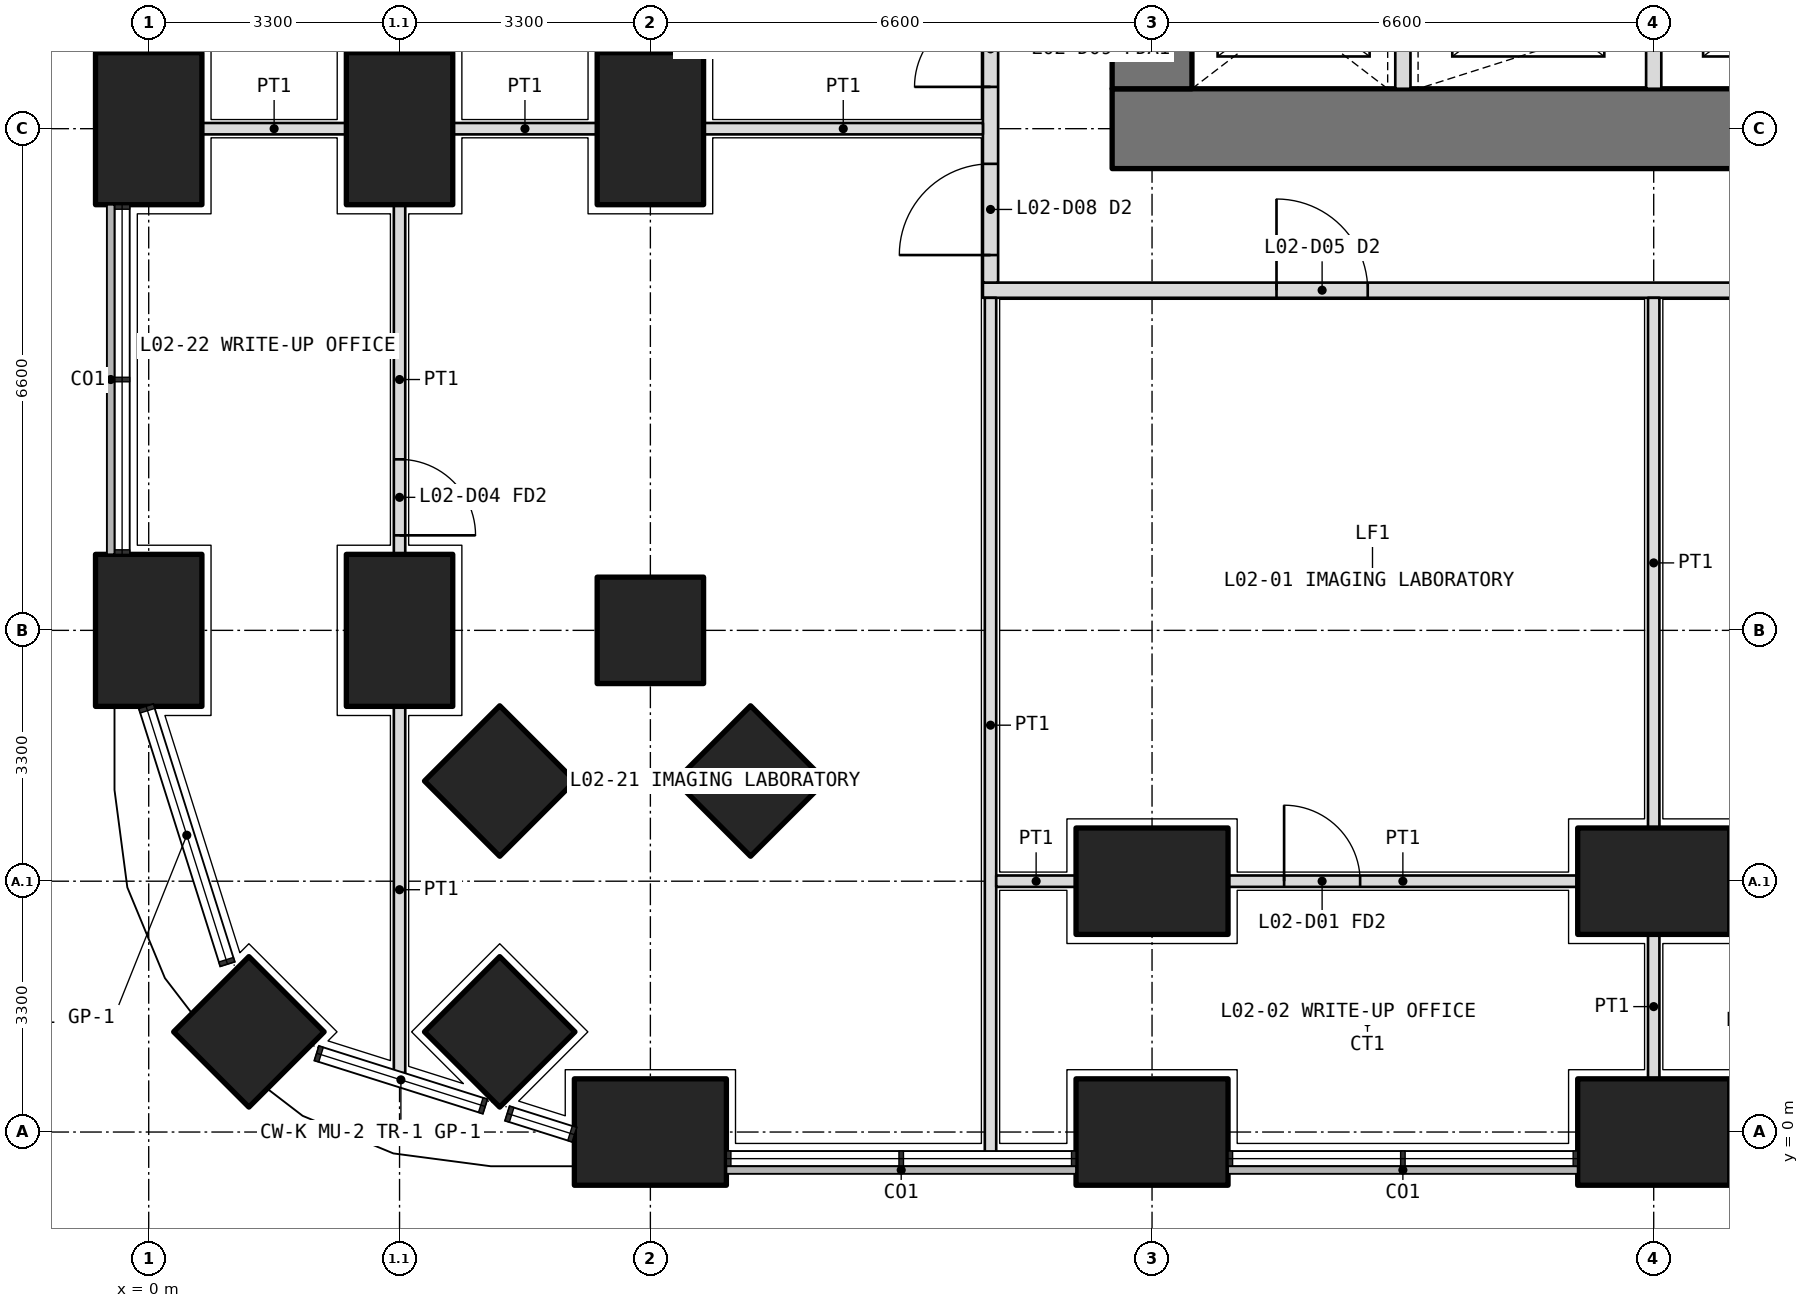
"""IFC4 building model, lengths in metres.
Left out: names, types, materials, properties, quantities, classifications, styles, units other than length and angle.
Written with IfcOpenShell. Run it as: python <this file> out.ifc"""

import sys

from ifc_helpers import new_model, si_unit, direction, frame, frame_2d, origin, origin_2d, place, context, subcontext, project, spatial, rectangle, extrude, element, fill, save


model = new_model("IFC4")
c1 = context("Model", 3, precision=1e-05, world=origin(), true_north=direction((0.0, 1.0)))
c2 = subcontext(c1, "Body", "Model", "MODEL_VIEW")
j1 = project(units=[si_unit("LENGTHUNIT", "METRE"), si_unit("PLANEANGLEUNIT", "RADIAN")], contexts=[c1])
p1 = place(None, origin())
s1 = spatial("IfcSite", under=j1, at=p1, CompositionType="ELEMENT")
p2 = place(p1, origin())
s2 = spatial("IfcBuilding", under=s1, at=p2, CompositionType="ELEMENT")
p3 = place(p2, frame((0.0, 0.0, 12.6)))
s3 = spatial("IfcBuildingStorey", under=s2, at=p3, CompositionType="ELEMENT", Elevation=12.6)
p4 = place(p3, frame((1.318, 1.318, 0.0), z_axis=(0.0, 0.0, 1.0), x_axis=(0.707106781187, 0.707106781187, 0.0)))
e1 = element("IfcColumn", 1, at=p4, inside=s3, PredefinedType="COLUMN", context=c2, shape_type="SweptSolid", body=[
    extrude(rectangle(XDim=1.4, YDim=1.4, at=origin_2d()), origin(), (0.0, 0.0, 1.0), 4.5),
])
for number, where, z_axis, x_axis in (
    (2, (6.6, 0.0, 0.0), (0.0, 0.0, 1.0), (1.0, 0.0, 0.0)),
    (3, (13.2, 0.0, 0.0), (0.0, 0.0, 1.0), (1.0, 0.0, 0.0)),
    (4, (19.8, 0.0, 0.0), (0.0, 0.0, 1.0), (1.0, 0.0, 0.0)),
    (5, (0.0, 6.6, 0.0), (0.0, 0.0, 1.0), (0.0, 1.0, 0.0)),
    (6, (0.0, 13.2, 0.0), (0.0, 0.0, 1.0), (0.0, 1.0, 0.0)),
):
    element("IfcColumn", number, at=place(p3, frame(where, z_axis=z_axis, x_axis=x_axis)), inside=s3, PredefinedType="COLUMN", context=c2, shape_type="SweptSolid", body=[
        extrude(rectangle(XDim=2.0, YDim=1.4, at=origin_2d()), origin(), (0.0, 0.0, 1.0), 4.5),
    ])
for number, where, z_axis, x_axis in (
    (7, (6.6, 6.6, 0.0), (0.0, 0.0, 1.0), (1.0, 0.0, 0.0)),
    (8, (4.618, 1.318, 0.0), (0.0, 0.0, 1.0), (0.707, 0.707, 0.0)),
):
    element("IfcColumn", number, at=place(p3, frame(where, z_axis=z_axis, x_axis=x_axis)), inside=s3, PredefinedType="COLUMN", context=c2, shape_type="SweptSolid", body=[
        extrude(rectangle(XDim=1.4, YDim=1.4, at=origin_2d()), origin(), (0.0, 0.0, 1.0), 4.5),
    ])
for number, where, z_axis, x_axis in (
    (9, (3.3, 6.6, 0.0), (0.0, 0.0, 1.0), (0.0, 1.0, 0.0)),
    (10, (3.3, 13.2, 0.0), (0.0, 0.0, 1.0), (0.0, 1.0, 0.0)),
):
    element("IfcColumn", number, at=place(p3, frame(where, z_axis=z_axis, x_axis=x_axis)), inside=s3, PredefinedType="COLUMN", context=c2, shape_type="SweptSolid", body=[
        extrude(rectangle(XDim=2.0, YDim=1.4, at=origin_2d()), origin(), (0.0, 0.0, 1.0), 4.5),
    ])
p5 = place(p3, frame((4.618, 4.618, 0.0), z_axis=(0.0, 0.0, 1.0), x_axis=(0.707106781187, 0.707106781187, 0.0)))
e11 = element("IfcColumn", 11, at=p5, inside=s3, PredefinedType="COLUMN", context=c2, shape_type="SweptSolid", body=[
    extrude(rectangle(XDim=1.4, YDim=1.4, at=origin_2d()), origin(), (0.0, 0.0, 1.0), 4.5),
])
for number, where, z_axis, x_axis in (
    (12, (13.2, 3.3, 0.0), (0.0, 0.0, 1.0), (1.0, 0.0, 0.0)),
    (13, (19.8, 3.3, 0.0), (0.0, 0.0, 1.0), (1.0, 0.0, 0.0)),
):
    element("IfcColumn", number, at=place(p3, frame(where, z_axis=z_axis, x_axis=x_axis)), inside=s3, PredefinedType="COLUMN", context=c2, shape_type="SweptSolid", body=[
        extrude(rectangle(XDim=2.0, YDim=1.4, at=origin_2d()), origin(), (0.0, 0.0, 1.0), 4.5),
    ])
p6 = place(p3, frame((7.918, 4.618, 0.0), z_axis=(0.0, 0.0, 1.0), x_axis=(0.707106781187, 0.707106781187, 0.0)))
e14 = element("IfcColumn", 14, at=p6, inside=s3, PredefinedType="COLUMN", context=c2, shape_type="SweptSolid", body=[
    extrude(rectangle(XDim=1.4, YDim=1.4, at=origin_2d()), origin(), (0.0, 0.0, 1.0), 4.5),
])
p7 = place(p3, frame((6.6, 13.2, 0.0), z_axis=(0.0, 0.0, 1.0), x_axis=(0.0, 1.0, 0.0)))
e15 = element("IfcColumn", 15, at=p7, inside=s3, PredefinedType="COLUMN", context=c2, shape_type="SweptSolid", body=[
    extrude(rectangle(XDim=2.0, YDim=1.4, at=origin_2d()), origin(), (0.0, 0.0, 1.0), 4.5),
])
p8 = place(p3, frame((12.675, 13.2, 0.0), z_axis=(0.0, 0.0, 1.0), x_axis=(1.0, 0.0, 0.0)))
e16 = element("IfcWall", 16, at=p8, inside=s3, PredefinedType="SHEAR", context=c2, shape_type="SweptSolid", body=[
    extrude(rectangle(XDim=27.45, YDim=1.05, at=frame_2d((13.725, 0.0))), origin(), (0.0, 0.0, 1.0), 4.5),
])
p9 = place(p3, frame((13.2, 32.475, 0.0), z_axis=(0.0, 0.0, 1.0), x_axis=(0.0, -1.0, 0.0)))
e17 = element("IfcWall", 17, at=p9, inside=s3, PredefinedType="SHEAR", context=c2, shape_type="SweptSolid", body=[
    extrude(rectangle(XDim=18.75, YDim=1.05, at=frame_2d((9.375, 0.0))), origin(), (0.0, 0.0, 1.0), 4.5),
])
p10 = place(p9, frame((14.125, 0.0, 0.0)))
e18 = element("IfcOpeningElement", 18, at=p10, cuts=e17, PredefinedType="OPENING", context=c2, shape_type="SweptSolid", body=[
    extrude(rectangle(XDim=1.6, YDim=2.1, at=frame_2d((0.8, 1.05))), frame((0.0, 0.535, 0.0), z_axis=(0.0, -1.0, 0.0), x_axis=(1.0, 0.0, 0.0)), (0.0, 0.0, 1.0), 1.07),
])
p11 = place(p9, frame((3.325, 0.0, 0.0)))
e19 = element("IfcOpeningElement", 19, at=p11, cuts=e17, PredefinedType="OPENING", context=c2, shape_type="SweptSolid", body=[
    extrude(rectangle(XDim=1.6, YDim=2.1, at=frame_2d((0.8, 1.05))), frame((0.0, 0.535, 0.0), z_axis=(0.0, -1.0, 0.0), x_axis=(1.0, 0.0, 0.0)), (0.0, 0.0, 1.0), 1.07),
])
for number, where, z_axis, x_axis in (
    (20, (16.5, 13.725, 0.0), (0.0, 0.0, 1.0), (0.0, 1.0, 0.0)),
    (21, (19.8, 13.725, 0.0), (0.0, 0.0, 1.0), (0.0, 1.0, 0.0)),
):
    element("IfcWall", number, at=place(p3, frame(where, z_axis=z_axis, x_axis=x_axis)), inside=s3, PredefinedType="PARTITIONING", context=c2, shape_type="SweptSolid", body=[
        extrude(rectangle(XDim=1.975, YDim=0.2, at=frame_2d((0.987, 0.0))), origin(), (0.0, 0.0, 1.0), 4.5),
    ])
p12 = place(p3, frame((10.975, 11.075, 0.0), z_axis=(0.0, 0.0, 1.0), x_axis=(1.0, 0.0, 0.0)))
e22 = element("IfcWall", 22, at=p12, inside=s3, PredefinedType="PARTITIONING", context=c2, shape_type="SweptSolid", body=[
    extrude(rectangle(XDim=30.85, YDim=0.2, at=frame_2d((15.425, 0.0))), origin(), (0.0, 0.0, 1.0), 3.15),
])
p13 = place(p12, frame((3.863, 0.0, 0.0)))
e23 = element("IfcOpeningElement", 23, at=p13, cuts=e22, PredefinedType="OPENING", context=c2, shape_type="SweptSolid", body=[
    extrude(rectangle(XDim=1.2, YDim=2.1, at=frame_2d((0.6, 1.05))), frame((0.0, 0.11, 0.0), z_axis=(0.0, -1.0, 0.0), x_axis=(1.0, 0.0, 0.0)), (0.0, 0.0, 1.0), 0.22),
])
p14 = place(p12, frame((14.825, 0.0, 0.0)))
e24 = element("IfcOpeningElement", 24, at=p14, cuts=e22, PredefinedType="OPENING", context=c2, shape_type="SweptSolid", body=[
    extrude(rectangle(XDim=1.2, YDim=2.1, at=frame_2d((0.6, 1.05))), frame((0.0, 0.11, 0.0), z_axis=(0.0, -1.0, 0.0), x_axis=(1.0, 0.0, 0.0)), (0.0, 0.0, 1.0), 0.22),
])
p15 = place(p12, frame((25.788, 0.0, 0.0)))
e25 = element("IfcOpeningElement", 25, at=p15, cuts=e22, PredefinedType="OPENING", context=c2, shape_type="SweptSolid", body=[
    extrude(rectangle(XDim=1.2, YDim=2.1, at=frame_2d((0.6, 1.05))), frame((0.0, 0.11, 0.0), z_axis=(0.0, -1.0, 0.0), x_axis=(1.0, 0.0, 0.0)), (0.0, 0.0, 1.0), 0.22),
])
p16 = place(p3, frame((11.075, 11.175, 0.0), z_axis=(0.0, 0.0, 1.0), x_axis=(0.0, 1.0, 0.0)))
e26 = element("IfcWall", 26, at=p16, inside=s3, PredefinedType="PARTITIONING", context=c2, shape_type="SweptSolid", body=[
    extrude(rectangle(XDim=23.85, YDim=0.2, at=frame_2d((11.925, 0.0))), origin(), (0.0, 0.0, 1.0), 3.15),
])
p17 = place(p16, frame((0.363, 0.0, 0.0)))
e27 = element("IfcOpeningElement", 27, at=p17, cuts=e26, PredefinedType="OPENING", context=c2, shape_type="SweptSolid", body=[
    extrude(rectangle(XDim=1.2, YDim=2.1, at=frame_2d((0.6, 1.05))), frame((0.0, 0.11, 0.0), z_axis=(0.0, -1.0, 0.0), x_axis=(1.0, 0.0, 0.0)), (0.0, 0.0, 1.0), 0.22),
])
p18 = place(p16, frame((2.575, 0.0, 0.0)))
e28 = element("IfcOpeningElement", 28, at=p18, cuts=e26, PredefinedType="OPENING", context=c2, shape_type="SweptSolid", body=[
    extrude(rectangle(XDim=1.0, YDim=2.1, at=frame_2d((0.5, 1.05))), frame((0.0, 0.11, 0.0), z_axis=(0.0, -1.0, 0.0), x_axis=(1.0, 0.0, 0.0)), (0.0, 0.0, 1.0), 0.22),
])
p19 = place(p16, frame((5.625, 0.0, 0.0)))
e29 = element("IfcOpeningElement", 29, at=p19, cuts=e26, PredefinedType="OPENING", context=c2, shape_type="SweptSolid", body=[
    extrude(rectangle(XDim=0.9, YDim=2.1, at=frame_2d((0.45, 1.05))), frame((0.0, 0.11, 0.0), z_axis=(0.0, -1.0, 0.0), x_axis=(1.0, 0.0, 0.0)), (0.0, 0.0, 1.0), 0.22),
])
p20 = place(p16, frame((9.425, 0.0, 0.0)))
e30 = element("IfcOpeningElement", 30, at=p20, cuts=e26, PredefinedType="OPENING", context=c2, shape_type="SweptSolid", body=[
    extrude(rectangle(XDim=0.9, YDim=2.1, at=frame_2d((0.45, 1.05))), frame((0.0, 0.11, 0.0), z_axis=(0.0, -1.0, 0.0), x_axis=(1.0, 0.0, 0.0)), (0.0, 0.0, 1.0), 0.22),
])
p21 = place(p16, frame((12.975, 0.0, 0.0)))
e31 = element("IfcOpeningElement", 31, at=p21, cuts=e26, PredefinedType="OPENING", context=c2, shape_type="SweptSolid", body=[
    extrude(rectangle(XDim=1.0, YDim=2.1, at=frame_2d((0.5, 1.05))), frame((0.0, 0.11, 0.0), z_axis=(0.0, -1.0, 0.0), x_axis=(1.0, 0.0, 0.0)), (0.0, 0.0, 1.0), 0.22),
])
p22 = place(p16, frame((18.988, 0.0, 0.0)))
e32 = element("IfcOpeningElement", 32, at=p22, cuts=e26, PredefinedType="OPENING", context=c2, shape_type="SweptSolid", body=[
    extrude(rectangle(XDim=1.2, YDim=2.1, at=frame_2d((0.6, 1.05))), frame((0.0, 0.11, 0.0), z_axis=(0.0, -1.0, 0.0), x_axis=(1.0, 0.0, 0.0)), (0.0, 0.0, 1.0), 0.22),
])
p23 = place(p3, frame((11.075, -0.27, 0.0), z_axis=(0.0, 0.0, 1.0), x_axis=(0.0, 1.0, 0.0)))
e33 = element("IfcWall", 33, at=p23, inside=s3, PredefinedType="PARTITIONING", context=c2, shape_type="SweptSolid", body=[
    extrude(rectangle(XDim=11.245, YDim=0.15, at=frame_2d((5.623, 0.0))), origin(), (0.0, 0.0, 1.0), 3.0),
])
p24 = place(p3, frame((11.15, 3.3, 0.0), z_axis=(0.0, 0.0, 1.0), x_axis=(1.0, 0.0, 0.0)))
e34 = element("IfcWall", 34, at=p24, inside=s3, PredefinedType="PARTITIONING", context=c2, shape_type="SweptSolid", body=[
    extrude(rectangle(XDim=1.05, YDim=0.15, at=frame_2d((0.525, 0.0))), origin(), (0.0, 0.0, 1.0), 4.2),
])
p25 = place(p3, frame((14.2, 3.3, 0.0), z_axis=(0.0, 0.0, 1.0), x_axis=(1.0, 0.0, 0.0)))
e35 = element("IfcWall", 35, at=p25, inside=s3, PredefinedType="PARTITIONING", context=c2, shape_type="SweptSolid", body=[
    extrude(rectangle(XDim=4.6, YDim=0.15, at=frame_2d((2.3, 0.0))), origin(), (0.0, 0.0, 1.0), 4.2),
])
p26 = place(p25, frame((0.738, 0.0, 0.0)))
e36 = element("IfcOpeningElement", 36, at=p26, cuts=e35, PredefinedType="OPENING", context=c2, shape_type="SweptSolid", body=[
    extrude(rectangle(XDim=1.0, YDim=2.1, at=frame_2d((0.5, 1.05))), frame((0.0, 0.085, 0.0), z_axis=(0.0, -1.0, 0.0), x_axis=(1.0, 0.0, 0.0)), (0.0, 0.0, 1.0), 0.17),
])
p27 = place(p3, frame((20.8, 3.3, 0.0), z_axis=(0.0, 0.0, 1.0), x_axis=(1.0, 0.0, 0.0)))
e37 = element("IfcWall", 37, at=p27, inside=s3, PredefinedType="PARTITIONING", context=c2, shape_type="SweptSolid", body=[
    extrude(rectangle(XDim=4.6, YDim=0.15, at=frame_2d((2.3, 0.0))), origin(), (0.0, 0.0, 1.0), 4.2),
])
p28 = place(p27, frame((3.35, 0.0, 0.0)))
e38 = element("IfcOpeningElement", 38, at=p28, cuts=e37, PredefinedType="OPENING", context=c2, shape_type="SweptSolid", body=[
    extrude(rectangle(XDim=1.0, YDim=2.1, at=frame_2d((0.5, 1.05))), frame((0.0, 0.085, 0.0), z_axis=(0.0, -1.0, 0.0), x_axis=(1.0, 0.0, 0.0)), (0.0, 0.0, 1.0), 0.17),
])
p29 = place(p3, frame((19.8, 0.7, 0.0), z_axis=(0.0, 0.0, 1.0), x_axis=(0.0, 1.0, 0.0)))
e39 = element("IfcWall", 39, at=p29, inside=s3, PredefinedType="PARTITIONING", context=c2, shape_type="SweptSolid", body=[
    extrude(rectangle(XDim=1.9, YDim=0.15, at=frame_2d((0.95, 0.0))), origin(), (0.0, 0.0, 1.0), 3.15),
])
p30 = place(p3, frame((19.8, 4.0, 0.0), z_axis=(0.0, 0.0, 1.0), x_axis=(0.0, 1.0, 0.0)))
e40 = element("IfcWall", 40, at=p30, inside=s3, PredefinedType="PARTITIONING", context=c2, shape_type="SweptSolid", body=[
    extrude(rectangle(XDim=6.975, YDim=0.15, at=frame_2d((3.488, 0.0))), origin(), (0.0, 0.0, 1.0), 3.15),
])
p31 = place(p3, frame((3.3, 12.2, 0.0), z_axis=(0.0, 0.0, 1.0), x_axis=(0.0, -1.0, 0.0)))
e41 = element("IfcWall", 41, at=p31, inside=s3, PredefinedType="PARTITIONING", context=c2, shape_type="SweptSolid", body=[
    extrude(rectangle(XDim=4.6, YDim=0.15, at=frame_2d((2.3, 0.0))), origin(), (0.0, 0.0, 1.0), 4.2),
])
p32 = place(p31, frame((3.35, 0.0, 0.0)))
e42 = element("IfcOpeningElement", 42, at=p32, cuts=e41, PredefinedType="OPENING", context=c2, shape_type="SweptSolid", body=[
    extrude(rectangle(XDim=1.0, YDim=2.1, at=frame_2d((0.5, 1.05))), frame((0.0, 0.085, 0.0), z_axis=(0.0, -1.0, 0.0), x_axis=(1.0, 0.0, 0.0)), (0.0, 0.0, 1.0), 0.17),
])
p33 = place(p3, frame((3.3, 5.6, 0.0), z_axis=(0.0, 0.0, 1.0), x_axis=(0.0, -1.0, 0.0)))
e43 = element("IfcWall", 43, at=p33, inside=s3, PredefinedType="PARTITIONING", context=c2, shape_type="SweptSolid", body=[
    extrude(rectangle(XDim=4.824, YDim=0.15, at=frame_2d((2.412, 0.0))), origin(), (0.0, 0.0, 1.0), 3.0),
])
p34 = place(p3, frame((0.7, 13.2, 0.0), z_axis=(0.0, 0.0, 1.0), x_axis=(1.0, 0.0, 0.0)))
e44 = element("IfcWall", 44, at=p34, inside=s3, PredefinedType="PARTITIONING", context=c2, shape_type="SweptSolid", body=[
    extrude(rectangle(XDim=1.9, YDim=0.15, at=frame_2d((0.95, 0.0))), origin(), (0.0, 0.0, 1.0), 3.15),
])
p35 = place(p3, frame((4.0, 13.2, 0.0), z_axis=(0.0, 0.0, 1.0), x_axis=(1.0, 0.0, 0.0)))
e45 = element("IfcWall", 45, at=p35, inside=s3, PredefinedType="PARTITIONING", context=c2, shape_type="SweptSolid", body=[
    extrude(rectangle(XDim=1.9, YDim=0.15, at=frame_2d((0.95, 0.0))), origin(), (0.0, 0.0, 1.0), 3.15),
])
p36 = place(p3, frame((7.3, 13.2, 0.0), z_axis=(0.0, 0.0, 1.0), x_axis=(1.0, 0.0, 0.0)))
e46 = element("IfcWall", 46, at=p36, inside=s3, PredefinedType="PARTITIONING", context=c2, shape_type="SweptSolid", body=[
    extrude(rectangle(XDim=3.675, YDim=0.15, at=frame_2d((1.837, 0.0))), origin(), (0.0, 0.0, 1.0), 3.15),
])
p37 = place(p13, origin())
e47 = element("IfcDoor", 47, at=p37, inside=s3, OperationType="DOUBLE_DOOR_SINGLE_SWING", PredefinedType="DOOR", context=c2, shape_type="SweptSolid", body=[
    extrude(rectangle(XDim=1.2, YDim=2.1, at=frame_2d((0.6, 1.05))), frame((0.0, 0.025, 0.0), z_axis=(0.0, -1.0, 0.0), x_axis=(1.0, 0.0, 0.0)), (0.0, 0.0, 1.0), 0.05),
])
fill(e23, e47)
p38 = place(p26, origin())
e48 = element("IfcDoor", 48, at=p38, inside=s3, OperationType="SINGLE_SWING_LEFT", PredefinedType="DOOR", context=c2, shape_type="SweptSolid", body=[
    extrude(rectangle(XDim=1.0, YDim=2.1, at=frame_2d((0.5, 1.05))), frame((0.0, 0.025, 0.0), z_axis=(0.0, -1.0, 0.0), x_axis=(1.0, 0.0, 0.0)), (0.0, 0.0, 1.0), 0.05),
])
fill(e36, e48)
p39 = place(p17, origin())
e49 = element("IfcDoor", 49, at=p39, inside=s3, OperationType="DOUBLE_DOOR_SINGLE_SWING", PredefinedType="DOOR", context=c2, shape_type="SweptSolid", body=[
    extrude(rectangle(XDim=1.2, YDim=2.1, at=frame_2d((0.6, 1.05))), frame((0.0, 0.025, 0.0), z_axis=(0.0, -1.0, 0.0), x_axis=(1.0, 0.0, 0.0)), (0.0, 0.0, 1.0), 0.05),
])
fill(e27, e49)
p40 = place(p32, origin())
e50 = element("IfcDoor", 50, at=p40, inside=s3, OperationType="SINGLE_SWING_RIGHT", PredefinedType="DOOR", context=c2, shape_type="SweptSolid", body=[
    extrude(rectangle(XDim=1.0, YDim=2.1, at=frame_2d((0.5, 1.05))), frame((0.0, 0.025, 0.0), z_axis=(0.0, -1.0, 0.0), x_axis=(1.0, 0.0, 0.0)), (0.0, 0.0, 1.0), 0.05),
])
fill(e42, e50)
p41 = place(p18, origin())
e51 = element("IfcDoor", 51, at=p41, inside=s3, OperationType="SINGLE_SWING_LEFT", PredefinedType="DOOR", context=c2, shape_type="SweptSolid", body=[
    extrude(rectangle(XDim=1.0, YDim=2.1, at=frame_2d((0.5, 1.05))), frame((0.0, 0.025, 0.0), z_axis=(0.0, -1.0, 0.0), x_axis=(1.0, 0.0, 0.0)), (0.0, 0.0, 1.0), 0.05),
])
fill(e28, e51)
save(model, sys.argv[1])
